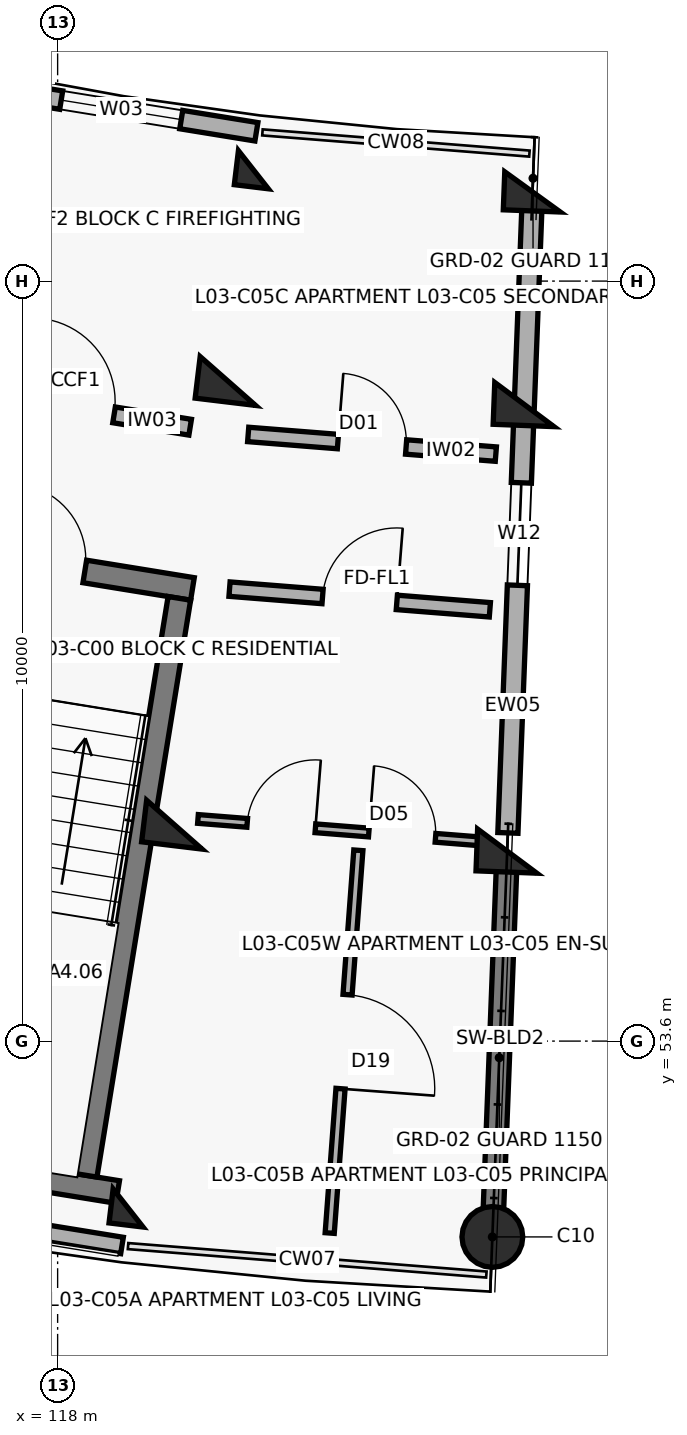
"""IFC4 building model, lengths in metres.
Left out: names, types, materials, properties, quantities, classifications, styles, units other than length and angle.
Written with IfcOpenShell. Run it as: python <this file> out.ifc"""

import sys

from ifc_helpers import new_model, si_unit, direction, frame, frame_2d, origin, origin_2d, place, context, subcontext, project, spatial, rectangle, circle, extrude, element, fill, save


model = new_model("IFC4")
c1 = context("Model", 3, precision=1e-05, world=origin(), true_north=direction((0.0, 1.0)))
c2 = subcontext(c1, "Body", "Model", "MODEL_VIEW")
j1 = project(units=[si_unit("LENGTHUNIT", "METRE"), si_unit("PLANEANGLEUNIT", "RADIAN")], contexts=[c1])
p1 = place(None, origin())
s1 = spatial("IfcSite", under=j1, at=p1, CompositionType="ELEMENT")
p2 = place(p1, origin())
s2 = spatial("IfcBuilding", under=s1, at=p2, CompositionType="ELEMENT")
p3 = place(p2, frame((0.0, 0.0, 11.2)))
s3 = spatial("IfcBuildingStorey", under=s2, at=p3, CompositionType="ELEMENT", Elevation=11.2)
p4 = place(p3, frame((120.575, 65.065, 0.0), z_axis=(0.0, 0.0, 1.0), x_axis=(-0.119790293837, -0.992799217114, 0.0)))
e1 = element("IfcColumn", 1, at=p4, inside=s3, PredefinedType="COLUMN", context=c2, shape_type="SweptSolid", body=[
    extrude(rectangle(XDim=0.45, YDim=0.45, at=origin_2d()), origin(), (0.0, 0.0, 1.0), 3.1),
])
for number, where, z_axis, x_axis in (
    (2, (120.24, 62.285, 0.0), (0.0, 0.0, 1.0), (-0.12, -0.993, 0.0)),
    (3, (119.535, 56.448, 0.0), (0.0, 0.0, 1.0), (-0.12, -0.993, 0.0)),
):
    element("IfcColumn", number, at=place(p3, frame(where, z_axis=z_axis, x_axis=x_axis)), inside=s3, PredefinedType="COLUMN", context=c2, shape_type="SweptSolid", body=[
        extrude(rectangle(XDim=0.55, YDim=0.8, at=origin_2d()), origin(), (0.0, 0.0, 1.0), 3.1),
    ])
p5 = place(p3, frame((118.927, 51.404, 0.0), z_axis=(0.0, 0.0, 1.0), x_axis=(-0.119790293837, -0.992799217114, 0.0)))
e4 = element("IfcColumn", 4, at=p5, inside=s3, PredefinedType="COLUMN", context=c2, shape_type="SweptSolid", body=[
    extrude(rectangle(XDim=0.45, YDim=0.45, at=origin_2d()), origin(), (0.0, 0.0, 1.0), 3.1),
])
p6 = place(p3, frame((124.248, 64.773, 0.0), z_axis=(0.0, 0.0, 1.0), x_axis=(-0.038387809088, -0.999262916411, 0.0)))
e5 = element("IfcColumn", 5, at=p6, inside=s3, PredefinedType="COLUMN", context=c2, shape_type="SweptSolid", body=[
    extrude(rectangle(XDim=0.5, YDim=0.75, at=origin_2d()), origin(), (0.0, 0.0, 1.0), 3.1),
])
for number, where, z_axis, x_axis in (
    (6, (124.14, 61.975, 0.0), (0.0, 0.0, 1.0), (-0.038, -0.999, 0.0)),
    (7, (123.915, 56.1, 0.0), (0.0, 0.0, 1.0), (-0.038, -0.999, 0.0)),
):
    element("IfcColumn", number, at=place(p3, frame(where, z_axis=z_axis, x_axis=x_axis)), inside=s3, PredefinedType="COLUMN", context=c2, shape_type="SweptSolid", body=[
        extrude(rectangle(XDim=0.55, YDim=0.8, at=origin_2d()), origin(), (0.0, 0.0, 1.0), 3.1),
    ])
p7 = place(p3, frame((123.72, 51.023, 0.0), z_axis=(0.0, 0.0, 1.0), x_axis=(-0.038387809088, -0.999262916411, 0.0)))
e8 = element("IfcColumn", 8, at=p7, inside=s3, PredefinedType="COLUMN", context=c2, shape_type="SweptSolid", body=[
    extrude(circle(Radius=0.4, at=origin_2d()), origin(), (0.0, 0.0, 1.0), 3.1),
])
p8 = place(p3, frame((123.908, 55.92, 0.0), z_axis=(0.0, 0.0, 1.0), x_axis=(-0.038381471406, -0.99926315986, 0.0)))
e9 = element("IfcWall", 9, at=p8, inside=s3, PredefinedType="SHEAR", context=c2, shape_type="SweptSolid", body=[
    extrude(rectangle(XDim=4.72, YDim=0.27, at=frame_2d((2.36, 0.0))), origin(), (0.0, 0.0, 1.0), 2.86),
])
p9 = place(p3, frame((114.1, 51.681, 0.0), z_axis=(0.0, 0.0, 1.0), x_axis=(0.987080750493, -0.160223568819, 0.0)))
e10 = element("IfcWall", 10, at=p9, inside=s3, PredefinedType="SOLIDWALL", context=c2, shape_type="SweptSolid", body=[
    extrude(rectangle(XDim=4.809, YDim=0.218, at=frame_2d((2.404, 0.0))), origin(), (0.0, 0.0, 1.0), 2.25),
])
p10 = place(p3, frame((117.058, 66.142, 0.0), z_axis=(0.0, 0.0, 1.0), x_axis=(0.987080874485, -0.160222804952, 0.0)))
e11 = element("IfcWall", 11, at=p10, inside=s3, PredefinedType="SOLIDWALL", context=c2, shape_type="SweptSolid", body=[
    extrude(rectangle(XDim=3.604, YDim=0.245, at=frame_2d((1.802, 0.0))), origin(), (0.0, 0.0, 1.0), 2.25),
])
p11 = place(p10, frame((1.002, 0.0, 0.32)))
e12 = element("IfcOpeningElement", 12, at=p11, cuts=e11, PredefinedType="OPENING", context=c2, shape_type="SweptSolid", body=[
    extrude(rectangle(XDim=1.6, YDim=1.5, at=frame_2d((0.8, 0.75))), frame((0.0, 0.133, 0.0), z_axis=(0.0, -1.0, 0.0), x_axis=(1.0, 0.0, 0.0)), (0.0, 0.0, 1.0), 0.265),
])
p12 = place(p3, frame((124.239, 64.533, 0.0), z_axis=(0.0, 0.0, 1.0), x_axis=(-0.038407966241, -0.999262141847, 0.0)))
e13 = element("IfcWall", 13, at=p12, inside=s3, PredefinedType="SOLIDWALL", context=c2, shape_type="SweptSolid", body=[
    extrude(rectangle(XDim=8.2, YDim=0.265, at=frame_2d((4.1, 0.0))), origin(), (0.0, 0.0, 1.0), 2.08),
])
p13 = place(p12, frame((3.59, 0.0, 0.75)))
e14 = element("IfcOpeningElement", 14, at=p13, cuts=e13, PredefinedType="OPENING", context=c2, shape_type="SweptSolid", body=[
    extrude(rectangle(XDim=1.35, YDim=1.35, at=frame_2d((0.675, 0.675))), frame((0.0, 0.142, 0.0), z_axis=(0.0, -1.0, 0.0), x_axis=(1.0, 0.0, 0.0)), (0.0, 0.0, 1.0), 0.285),
])
p14 = place(p3, frame((115.954, 60.169, 0.0), z_axis=(0.0, 0.0, 1.0), x_axis=(0.987077443397, -0.160243941341, 0.0)))
e15 = element("IfcWall", 15, at=p14, inside=s3, PredefinedType="SHEAR", context=c2, shape_type="SweptSolid", body=[
    extrude(rectangle(XDim=3.87, YDim=0.3, at=frame_2d((1.935, 0.0))), origin(), (0.0, 0.0, 1.0), 3.1),
])
p15 = place(p14, frame((1.435, 0.0, 0.0)))
e16 = element("IfcOpeningElement", 16, at=p15, cuts=e15, PredefinedType="OPENING", context=c2, shape_type="SweptSolid", body=[
    extrude(rectangle(XDim=1.0, YDim=2.15, at=frame_2d((0.5, 1.075))), frame((0.0, 0.16, 0.0), z_axis=(0.0, -1.0, 0.0), x_axis=(1.0, 0.0, 0.0)), (0.0, 0.0, 1.0), 0.32),
])
p16 = place(p3, frame((114.377, 52.331, 0.0), z_axis=(0.0, 0.0, 1.0), x_axis=(0.987077474317, -0.16024375088, 0.0)))
e17 = element("IfcWall", 17, at=p16, inside=s3, PredefinedType="SHEAR", context=c2, shape_type="SweptSolid", body=[
    extrude(rectangle(XDim=4.47, YDim=0.3, at=frame_2d((2.235, 0.0))), origin(), (0.0, 0.0, 1.0), 3.1),
])
p17 = place(p3, frame((119.602, 59.425, 0.0), z_axis=(0.0, 0.0, 1.0), x_axis=(-0.160201584773, -0.987084318706, 0.0)))
e18 = element("IfcWall", 18, at=p17, inside=s3, PredefinedType="SHEAR", context=c2, shape_type="SweptSolid", body=[
    extrude(rectangle(XDim=7.69, YDim=0.3, at=frame_2d((3.845, 0.0))), origin(), (0.0, 0.0, 1.0), 3.1),
])
p18 = place(p3, frame((116.656, 62.178, 0.0), z_axis=(0.0, 0.0, 1.0), x_axis=(0.987083140276, -0.16020884552, 0.0)))
e19 = element("IfcWall", 19, at=p18, inside=s3, PredefinedType="SOLIDWALL", context=c2, shape_type="SweptSolid", body=[
    extrude(rectangle(XDim=3.129, YDim=0.21, at=frame_2d((1.564, 0.0))), origin(), (0.0, 0.0, 1.0), 2.08),
])
p19 = place(p18, frame((1.014, 0.0, 0.0)))
e20 = element("IfcOpeningElement", 20, at=p19, cuts=e19, PredefinedType="OPENING", context=c2, shape_type="SweptSolid", body=[
    extrude(rectangle(XDim=1.1, YDim=2.15, at=frame_2d((0.55, 1.075))), frame((0.0, 0.115, 0.0), z_axis=(0.0, -1.0, 0.0), x_axis=(1.0, 0.0, 0.0)), (0.0, 0.0, 1.0), 0.23),
])
p20 = place(p3, frame((120.261, 59.547, 0.0), z_axis=(0.0, 0.0, 1.0), x_axis=(0.996862545573, -0.079152165058, 0.0)))
e21 = element("IfcWall", 21, at=p20, inside=s3, PredefinedType="SOLIDWALL", context=c2, shape_type="SweptSolid", body=[
    extrude(rectangle(XDim=3.436, YDim=0.19, at=frame_2d((1.718, 0.0))), origin(), (0.0, 0.0, 1.0), 2.08),
])
p21 = place(p20, frame((1.228, 0.0, 0.0)))
e22 = element("IfcOpeningElement", 22, at=p21, cuts=e21, PredefinedType="OPENING", context=c2, shape_type="SweptSolid", body=[
    extrude(rectangle(XDim=0.98, YDim=2.15, at=frame_2d((0.49, 1.075))), frame((0.0, 0.105, 0.0), z_axis=(0.0, -1.0, 0.0), x_axis=(1.0, 0.0, 0.0)), (0.0, 0.0, 1.0), 0.21),
])
p22 = place(p3, frame((120.507, 61.582, 0.0), z_axis=(0.0, 0.0, 1.0), x_axis=(0.996860715473, -0.07917521043, 0.0)))
e23 = element("IfcWall", 23, at=p22, inside=s3, PredefinedType="SOLIDWALL", context=c2, shape_type="SweptSolid", body=[
    extrude(rectangle(XDim=3.269, YDim=0.19, at=frame_2d((1.634, 0.0))), origin(), (0.0, 0.0, 1.0), 2.08),
])
p23 = place(p22, frame((1.184, 0.0, 0.0)))
e24 = element("IfcOpeningElement", 24, at=p23, cuts=e23, PredefinedType="OPENING", context=c2, shape_type="SweptSolid", body=[
    extrude(rectangle(XDim=0.9, YDim=2.1, at=frame_2d((0.45, 1.05))), frame((0.0, 0.105, 0.0), z_axis=(0.0, -1.0, 0.0), x_axis=(1.0, 0.0, 0.0)), (0.0, 0.0, 1.0), 0.21),
])
p24 = place(p3, frame((119.846, 56.523, 0.0), z_axis=(0.0, 0.0, 1.0), x_axis=(0.996863292793, -0.079142753818, 0.0)))
e25 = element("IfcWall", 25, at=p24, inside=s3, PredefinedType="PARTITIONING", context=c2, shape_type="SweptSolid", body=[
    extrude(rectangle(XDim=3.785, YDim=0.115, at=frame_2d((1.893, 0.0))), origin(), (0.0, 0.0, 1.0), 2.08),
])
p25 = place(p24, frame((0.65, 0.0, 0.0)))
e26 = element("IfcOpeningElement", 26, at=p25, cuts=e25, PredefinedType="OPENING", context=c2, shape_type="SweptSolid", body=[
    extrude(rectangle(XDim=0.9, YDim=2.1, at=frame_2d((0.45, 1.05))), frame((0.0, 0.067, 0.0), z_axis=(0.0, -1.0, 0.0), x_axis=(1.0, 0.0, 0.0)), (0.0, 0.0, 1.0), 0.135),
])
p26 = place(p24, frame((2.255, 0.0, 0.0)))
e27 = element("IfcOpeningElement", 27, at=p26, cuts=e25, PredefinedType="OPENING", context=c2, shape_type="SweptSolid", body=[
    extrude(rectangle(XDim=0.88, YDim=2.1, at=frame_2d((0.44, 1.05))), frame((0.0, 0.067, 0.0), z_axis=(0.0, -1.0, 0.0), x_axis=(1.0, 0.0, 0.0)), (0.0, 0.0, 1.0), 0.135),
])
p27 = place(p3, frame((121.957, 56.11, 0.0), z_axis=(0.0, 0.0, 1.0), x_axis=(-0.074644522148, -0.997210206182, 0.0)))
e28 = element("IfcWall", 28, at=p27, inside=s3, PredefinedType="PARTITIONING", context=c2, shape_type="SweptSolid", body=[
    extrude(rectangle(XDim=5.05, YDim=0.12, at=frame_2d((2.525, 0.0))), origin(), (0.0, 0.0, 1.0), 2.08),
])
p28 = place(p27, frame((1.905, 0.0, 0.0)))
e29 = element("IfcOpeningElement", 29, at=p28, cuts=e28, PredefinedType="OPENING", context=c2, shape_type="SweptSolid", body=[
    extrude(rectangle(XDim=1.24, YDim=2.1, at=frame_2d((0.62, 1.05))), frame((0.0, 0.07, 0.0), z_axis=(0.0, -1.0, 0.0), x_axis=(1.0, 0.0, 0.0)), (0.0, 0.0, 1.0), 0.14),
])
p29 = place(p11, origin())
e30 = element("IfcWindow", 30, at=p29, inside=s3, PartitioningType="DOUBLE_PANEL_VERTICAL", PredefinedType="WINDOW", context=c2, shape_type="SweptSolid", body=[
    extrude(rectangle(XDim=1.6, YDim=1.5, at=frame_2d((0.8, 0.75))), frame((0.0, 0.03, 0.0), z_axis=(0.0, -1.0, 0.0), x_axis=(1.0, 0.0, 0.0)), (0.0, 0.0, 1.0), 0.06),
])
fill(e12, e30)
p30 = place(p13, origin())
e31 = element("IfcWindow", 31, at=p30, inside=s3, PartitioningType="DOUBLE_PANEL_VERTICAL", PredefinedType="WINDOW", context=c2, shape_type="SweptSolid", body=[
    extrude(rectangle(XDim=1.35, YDim=1.35, at=frame_2d((0.675, 0.675))), frame((0.0, 0.03, 0.0), z_axis=(0.0, -1.0, 0.0), x_axis=(1.0, 0.0, 0.0)), (0.0, 0.0, 1.0), 0.06),
])
fill(e14, e31)
p31 = place(p15, origin())
e32 = element("IfcDoor", 32, at=p31, inside=s3, OperationType="SINGLE_SWING_LEFT", PredefinedType="DOOR", context=c2, shape_type="SweptSolid", body=[
    extrude(rectangle(XDim=1.0, YDim=2.15, at=frame_2d((0.5, 1.075))), frame((0.0, 0.025, 0.0), z_axis=(0.0, -1.0, 0.0), x_axis=(1.0, 0.0, 0.0)), (0.0, 0.0, 1.0), 0.05),
])
fill(e16, e32)
p32 = place(p19, origin())
e33 = element("IfcDoor", 33, at=p32, inside=s3, OperationType="SINGLE_SWING_LEFT", PredefinedType="DOOR", context=c2, shape_type="SweptSolid", body=[
    extrude(rectangle(XDim=1.1, YDim=2.15, at=frame_2d((0.55, 1.075))), frame((0.0, 0.025, 0.0), z_axis=(0.0, -1.0, 0.0), x_axis=(1.0, 0.0, 0.0)), (0.0, 0.0, 1.0), 0.05),
])
fill(e20, e33)
p33 = place(p21, origin())
e34 = element("IfcDoor", 34, at=p33, inside=s3, OperationType="SINGLE_SWING_RIGHT", PredefinedType="DOOR", context=c2, shape_type="SweptSolid", body=[
    extrude(rectangle(XDim=0.98, YDim=2.15, at=frame_2d((0.49, 1.075))), frame((0.0, 0.025, 0.0), z_axis=(0.0, -1.0, 0.0), x_axis=(1.0, 0.0, 0.0)), (0.0, 0.0, 1.0), 0.05),
])
fill(e22, e34)
p34 = place(p23, origin())
e35 = element("IfcDoor", 35, at=p34, inside=s3, OperationType="SINGLE_SWING_LEFT", PredefinedType="DOOR", context=c2, shape_type="SweptSolid", body=[
    extrude(rectangle(XDim=0.9, YDim=2.1, at=frame_2d((0.45, 1.05))), frame((0.0, 0.025, 0.0), z_axis=(0.0, -1.0, 0.0), x_axis=(1.0, 0.0, 0.0)), (0.0, 0.0, 1.0), 0.05),
])
fill(e24, e35)
p35 = place(p25, origin())
e36 = element("IfcDoor", 36, at=p35, inside=s3, OperationType="SINGLE_SWING_RIGHT", PredefinedType="DOOR", context=c2, shape_type="SweptSolid", body=[
    extrude(rectangle(XDim=0.9, YDim=2.1, at=frame_2d((0.45, 1.05))), frame((0.0, 0.025, 0.0), z_axis=(0.0, -1.0, 0.0), x_axis=(1.0, 0.0, 0.0)), (0.0, 0.0, 1.0), 0.05),
])
fill(e26, e36)
p36 = place(p26, origin())
e37 = element("IfcDoor", 37, at=p36, inside=s3, OperationType="SINGLE_SWING_LEFT", PredefinedType="DOOR", context=c2, shape_type="SweptSolid", body=[
    extrude(rectangle(XDim=0.88, YDim=2.1, at=frame_2d((0.44, 1.05))), frame((0.0, 0.025, 0.0), z_axis=(0.0, -1.0, 0.0), x_axis=(1.0, 0.0, 0.0)), (0.0, 0.0, 1.0), 0.05),
])
fill(e27, e37)
p37 = place(p28, origin())
e38 = element("IfcDoor", 38, at=p37, inside=s3, OperationType="SINGLE_SWING_RIGHT", PredefinedType="DOOR", context=c2, shape_type="SweptSolid", body=[
    extrude(rectangle(XDim=1.24, YDim=2.1, at=frame_2d((0.62, 1.05))), frame((0.0, 0.025, 0.0), z_axis=(0.0, -1.0, 0.0), x_axis=(1.0, 0.0, 0.0)), (0.0, 0.0, 1.0), 0.05),
])
fill(e29, e38)
save(model, sys.argv[1])
